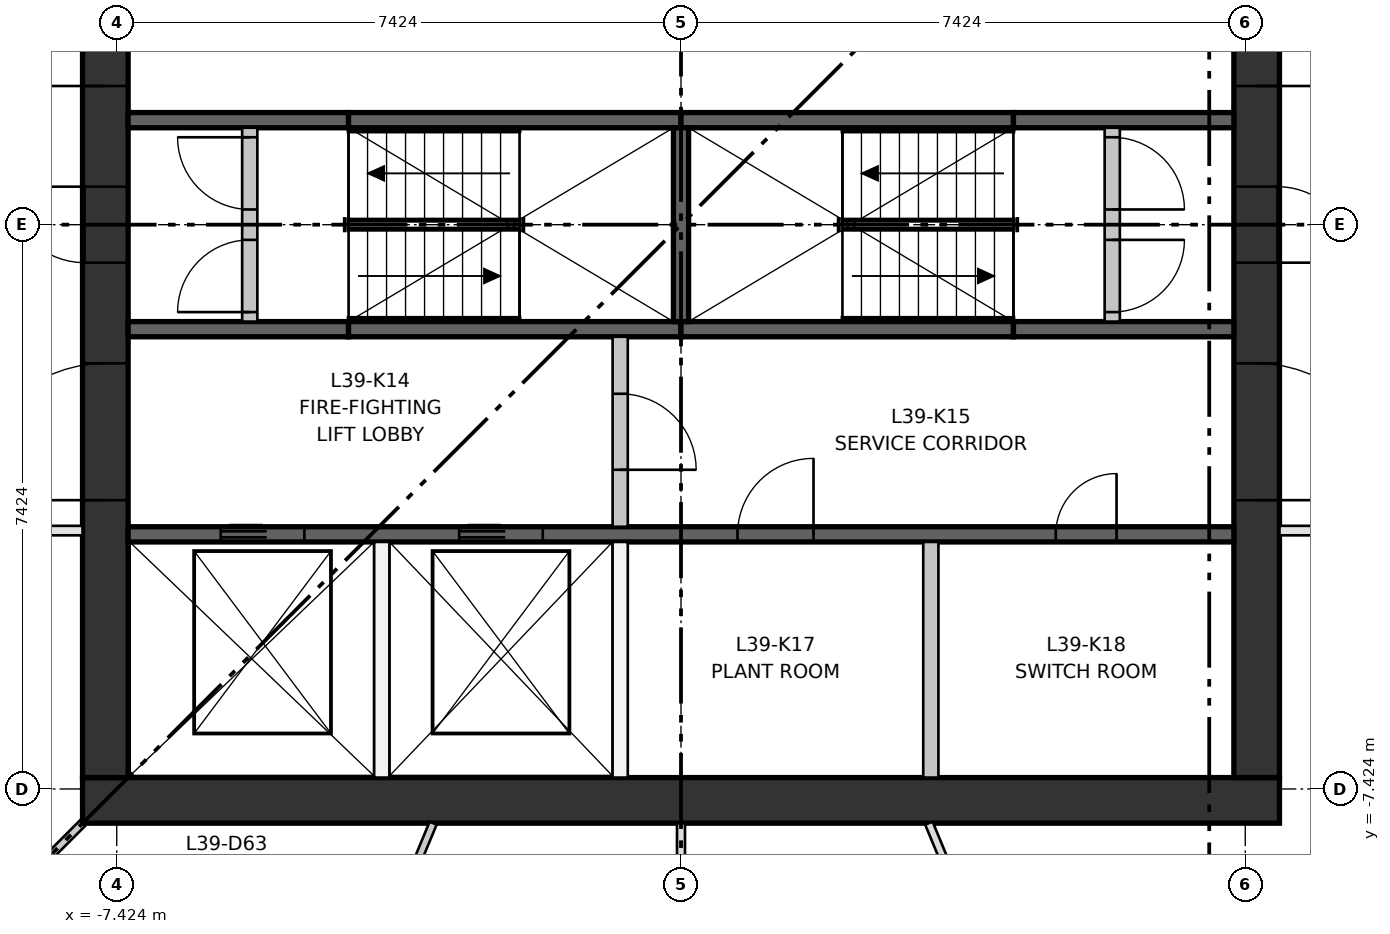
"""IFC4 building model, lengths in metres.
Left out: names, types, materials, properties, quantities, classifications, styles, units other than length and angle.
Written with IfcOpenShell. Run it as: python <this file> out.ifc"""

import sys

from ifc_helpers import new_model, si_unit, direction, frame, frame_2d, origin, place, context, subcontext, project, spatial, rectangle, extrude, element, fill, save


model = new_model("IFC4")
c1 = context("Model", 3, precision=1e-05, world=origin(), true_north=direction((0.0, 1.0)))
c2 = subcontext(c1, "Body", "Model", "MODEL_VIEW")
j1 = project(units=[si_unit("LENGTHUNIT", "METRE"), si_unit("PLANEANGLEUNIT", "RADIAN")], contexts=[c1])
p1 = place(None, origin())
s1 = spatial("IfcSite", under=j1, at=p1, CompositionType="ELEMENT")
p2 = place(p1, origin())
s2 = spatial("IfcBuilding", under=s1, at=p2, CompositionType="ELEMENT")
p3 = place(p2, frame((0.0, 0.0, 147.75)))
s3 = spatial("IfcBuildingStorey", under=s2, at=p3, CompositionType="ELEMENT", Elevation=147.75)
p4 = place(p3, frame((-7.874, -7.574, 0.0), z_axis=(0.0, 0.0, 1.0), x_axis=(1.0, 0.0, 0.0)))
e1 = element("IfcWall", 1, at=p4, inside=s3, PredefinedType="SHEAR", context=c2, shape_type="SweptSolid", body=[
    extrude(rectangle(XDim=15.748, YDim=0.6, at=frame_2d((7.874, 0.0))), origin(), (0.0, 0.0, 1.0), 3.35),
])
p5 = place(p3, frame((-7.574, -7.274, 0.0), z_axis=(0.0, 0.0, 1.0), x_axis=(0.0, 1.0, 0.0)))
e2 = element("IfcWall", 2, at=p5, inside=s3, PredefinedType="SHEAR", context=c2, shape_type="SweptSolid", body=[
    extrude(rectangle(XDim=14.548, YDim=0.6, at=frame_2d((7.274, 0.0))), origin(), (0.0, 0.0, 1.0), 3.35),
])
p6 = place(p5, frame((6.774, 0.0, 0.0)))
e3 = element("IfcOpeningElement", 3, at=p6, cuts=e2, PredefinedType="OPENING", context=c2, shape_type="SweptSolid", body=[
    extrude(rectangle(XDim=1.0, YDim=2.1, at=frame_2d((0.5, 1.05))), frame((0.0, 0.31, 0.0), z_axis=(0.0, -1.0, 0.0), x_axis=(1.0, 0.0, 0.0)), (0.0, 0.0, 1.0), 0.62),
])
p7 = place(p5, frame((3.649, 0.0, 0.0)))
e4 = element("IfcOpeningElement", 4, at=p7, cuts=e2, PredefinedType="OPENING", context=c2, shape_type="SweptSolid", body=[
    extrude(rectangle(XDim=1.8, YDim=2.1, at=frame_2d((0.9, 1.05))), frame((0.0, 0.31, 0.0), z_axis=(0.0, -1.0, 0.0), x_axis=(1.0, 0.0, 0.0)), (0.0, 0.0, 1.0), 0.62),
])
p8 = place(p5, frame((9.098, 0.0, 0.0)))
e5 = element("IfcOpeningElement", 5, at=p8, cuts=e2, PredefinedType="OPENING", context=c2, shape_type="SweptSolid", body=[
    extrude(rectangle(XDim=1.8, YDim=2.1, at=frame_2d((0.9, 1.05))), frame((0.0, 0.31, 0.0), z_axis=(0.0, -1.0, 0.0), x_axis=(1.0, 0.0, 0.0)), (0.0, 0.0, 1.0), 0.62),
])
p9 = place(p3, frame((7.574, -7.274, 0.0), z_axis=(0.0, 0.0, 1.0), x_axis=(0.0, 1.0, 0.0)))
e6 = element("IfcWall", 6, at=p9, inside=s3, PredefinedType="SHEAR", context=c2, shape_type="SweptSolid", body=[
    extrude(rectangle(XDim=14.548, YDim=0.6, at=frame_2d((7.274, 0.0))), origin(), (0.0, 0.0, 1.0), 3.35),
])
p10 = place(p9, frame((6.774, 0.0, 0.0)))
e7 = element("IfcOpeningElement", 7, at=p10, cuts=e6, PredefinedType="OPENING", context=c2, shape_type="SweptSolid", body=[
    extrude(rectangle(XDim=1.0, YDim=2.1, at=frame_2d((0.5, 1.05))), frame((0.0, 0.31, 0.0), z_axis=(0.0, -1.0, 0.0), x_axis=(1.0, 0.0, 0.0)), (0.0, 0.0, 1.0), 0.62),
])
p11 = place(p9, frame((3.649, 0.0, 0.0)))
e8 = element("IfcOpeningElement", 8, at=p11, cuts=e6, PredefinedType="OPENING", context=c2, shape_type="SweptSolid", body=[
    extrude(rectangle(XDim=1.8, YDim=2.1, at=frame_2d((0.9, 1.05))), frame((0.0, 0.31, 0.0), z_axis=(0.0, -1.0, 0.0), x_axis=(1.0, 0.0, 0.0)), (0.0, 0.0, 1.0), 0.62),
])
p12 = place(p9, frame((9.098, 0.0, 0.0)))
e9 = element("IfcOpeningElement", 9, at=p12, cuts=e6, PredefinedType="OPENING", context=c2, shape_type="SweptSolid", body=[
    extrude(rectangle(XDim=1.8, YDim=2.1, at=frame_2d((0.9, 1.05))), frame((0.0, 0.31, 0.0), z_axis=(0.0, -1.0, 0.0), x_axis=(1.0, 0.0, 0.0)), (0.0, 0.0, 1.0), 0.62),
])
p13 = place(p3, frame((-7.274, -4.074, 0.0), z_axis=(0.0, 0.0, 1.0), x_axis=(1.0, 0.0, 0.0)))
e10 = element("IfcWall", 10, at=p13, inside=s3, PredefinedType="SHEAR", context=c2, shape_type="SweptSolid", body=[
    extrude(rectangle(XDim=14.548, YDim=0.2, at=frame_2d((7.274, 0.0))), origin(), (0.0, 0.0, 1.0), 3.0),
])
p14 = place(p13, frame((1.219, 0.0, 0.0)))
e11 = element("IfcOpeningElement", 11, at=p14, cuts=e10, PredefinedType="OPENING", context=c2, shape_type="SweptSolid", body=[
    extrude(rectangle(XDim=1.1, YDim=2.1, at=frame_2d((0.55, 1.05))), frame((0.0, 0.11, 0.0), z_axis=(0.0, -1.0, 0.0), x_axis=(1.0, 0.0, 0.0)), (0.0, 0.0, 1.0), 0.22),
])
p15 = place(p13, frame((4.355, 0.0, 0.0)))
e12 = element("IfcOpeningElement", 12, at=p15, cuts=e10, PredefinedType="OPENING", context=c2, shape_type="SweptSolid", body=[
    extrude(rectangle(XDim=1.1, YDim=2.1, at=frame_2d((0.55, 1.05))), frame((0.0, 0.11, 0.0), z_axis=(0.0, -1.0, 0.0), x_axis=(1.0, 0.0, 0.0)), (0.0, 0.0, 1.0), 0.22),
])
p16 = place(p13, frame((8.018, 0.0, 0.0)))
e13 = element("IfcOpeningElement", 13, at=p16, cuts=e10, PredefinedType="OPENING", context=c2, shape_type="SweptSolid", body=[
    extrude(rectangle(XDim=1.0, YDim=2.1, at=frame_2d((0.5, 1.05))), frame((0.0, 0.11, 0.0), z_axis=(0.0, -1.0, 0.0), x_axis=(1.0, 0.0, 0.0)), (0.0, 0.0, 1.0), 0.22),
])
p17 = place(p13, frame((12.205, 0.0, 0.0)))
e14 = element("IfcOpeningElement", 14, at=p17, cuts=e10, PredefinedType="OPENING", context=c2, shape_type="SweptSolid", body=[
    extrude(rectangle(XDim=0.8, YDim=2.1, at=frame_2d((0.4, 1.05))), frame((0.0, 0.11, 0.0), z_axis=(0.0, -1.0, 0.0), x_axis=(1.0, 0.0, 0.0)), (0.0, 0.0, 1.0), 0.22),
])
p18 = place(p3, frame((-7.274, -1.375, 0.0), z_axis=(0.0, 0.0, 1.0), x_axis=(1.0, 0.0, 0.0)))
e15 = element("IfcWall", 15, at=p18, inside=s3, PredefinedType="SHEAR", context=c2, shape_type="SweptSolid", body=[
    extrude(rectangle(XDim=2.9, YDim=0.2, at=frame_2d((1.45, 0.0))), origin(), (0.0, 0.0, 1.0), 3.0),
])
for number, where, z_axis, x_axis in (
    (16, (-4.374, -1.375, 0.0), (0.0, 0.0, 1.0), (1.0, 0.0, 0.0)),
    (17, (0.0, -1.375, 0.0), (0.0, 0.0, 1.0), (1.0, 0.0, 0.0)),
):
    element("IfcWall", number, at=place(p3, frame(where, z_axis=z_axis, x_axis=x_axis)), inside=s3, PredefinedType="SHEAR", context=c2, shape_type="SweptSolid", body=[
        extrude(rectangle(XDim=4.374, YDim=0.2, at=frame_2d((2.187, 0.0))), origin(), (0.0, 0.0, 1.0), 3.0),
    ])
for number, where, z_axis, x_axis in (
    (18, (4.374, -1.375, 0.0), (0.0, 0.0, 1.0), (1.0, 0.0, 0.0)),
    (19, (-7.274, 1.375, 0.0), (0.0, 0.0, 1.0), (1.0, 0.0, 0.0)),
):
    element("IfcWall", number, at=place(p3, frame(where, z_axis=z_axis, x_axis=x_axis)), inside=s3, PredefinedType="SHEAR", context=c2, shape_type="SweptSolid", body=[
        extrude(rectangle(XDim=2.9, YDim=0.2, at=frame_2d((1.45, 0.0))), origin(), (0.0, 0.0, 1.0), 3.0),
    ])
for number, where, z_axis, x_axis in (
    (20, (-4.374, 1.375, 0.0), (0.0, 0.0, 1.0), (1.0, 0.0, 0.0)),
    (21, (0.0, 1.375, 0.0), (0.0, 0.0, 1.0), (1.0, 0.0, 0.0)),
):
    element("IfcWall", number, at=place(p3, frame(where, z_axis=z_axis, x_axis=x_axis)), inside=s3, PredefinedType="SHEAR", context=c2, shape_type="SweptSolid", body=[
        extrude(rectangle(XDim=4.374, YDim=0.2, at=frame_2d((2.187, 0.0))), origin(), (0.0, 0.0, 1.0), 3.0),
    ])
p19 = place(p3, frame((4.374, 1.375, 0.0), z_axis=(0.0, 0.0, 1.0), x_axis=(1.0, 0.0, 0.0)))
e22 = element("IfcWall", 22, at=p19, inside=s3, PredefinedType="SHEAR", context=c2, shape_type="SweptSolid", body=[
    extrude(rectangle(XDim=2.9, YDim=0.2, at=frame_2d((1.45, 0.0))), origin(), (0.0, 0.0, 1.0), 3.0),
])
p20 = place(p3, frame((0.0, -1.275, 0.0), z_axis=(0.0, 0.0, 1.0), x_axis=(0.0, 1.0, 0.0)))
e23 = element("IfcWall", 23, at=p20, inside=s3, PredefinedType="SHEAR", context=c2, shape_type="SweptSolid", body=[
    extrude(rectangle(XDim=2.55, YDim=0.2, at=frame_2d((1.275, 0.0))), origin(), (0.0, 0.0, 1.0), 3.0),
])
for number, where, z_axis, x_axis in (
    (24, (-3.937, -7.274, 0.0), (0.0, 0.0, 1.0), (0.0, 1.0, 0.0)),
    (25, (-0.8, -7.274, 0.0), (0.0, 0.0, 1.0), (0.0, 1.0, 0.0)),
):
    element("IfcWall", number, at=place(p3, frame(where, z_axis=z_axis, x_axis=x_axis)), inside=s3, PredefinedType="PARTITIONING", context=c2, shape_type="SweptSolid", body=[
        extrude(rectangle(XDim=3.1, YDim=0.2, at=frame_2d((1.55, 0.0))), origin(), (0.0, 0.0, 1.0), 3.0),
    ])
p21 = place(p3, frame((-0.8, -3.974, 0.0), z_axis=(0.0, 0.0, 1.0), x_axis=(0.0, 1.0, 0.0)))
e26 = element("IfcWall", 26, at=p21, inside=s3, PredefinedType="PARTITIONING", context=c2, shape_type="SweptSolid", body=[
    extrude(rectangle(XDim=2.499, YDim=0.2, at=frame_2d((1.25, 0.0))), origin(), (0.0, 0.0, 1.0), 3.0),
])
p22 = place(p21, frame((0.75, 0.0, 0.0)))
e27 = element("IfcOpeningElement", 27, at=p22, cuts=e26, PredefinedType="OPENING", context=c2, shape_type="SweptSolid", body=[
    extrude(rectangle(XDim=1.0, YDim=2.1, at=frame_2d((0.5, 1.05))), frame((0.0, 0.11, 0.0), z_axis=(0.0, -1.0, 0.0), x_axis=(1.0, 0.0, 0.0)), (0.0, 0.0, 1.0), 0.22),
])
p23 = place(p3, frame((3.287, -7.274, 0.0), z_axis=(0.0, 0.0, 1.0), x_axis=(0.0, 1.0, 0.0)))
e28 = element("IfcWall", 28, at=p23, inside=s3, PredefinedType="PARTITIONING", context=c2, shape_type="SweptSolid", body=[
    extrude(rectangle(XDim=3.1, YDim=0.2, at=frame_2d((1.55, 0.0))), origin(), (0.0, 0.0, 1.0), 3.0),
])
p24 = place(p3, frame((-5.674, -1.275, 0.0), z_axis=(0.0, 0.0, 1.0), x_axis=(0.0, 1.0, 0.0)))
e29 = element("IfcWall", 29, at=p24, inside=s3, PredefinedType="PARTITIONING", context=c2, shape_type="SweptSolid", body=[
    extrude(rectangle(XDim=2.55, YDim=0.2, at=frame_2d((1.275, 0.0))), origin(), (0.0, 0.0, 1.0), 3.0),
])
p25 = place(p24, frame((0.125, 0.0, 0.0)))
e30 = element("IfcOpeningElement", 30, at=p25, cuts=e29, PredefinedType="OPENING", context=c2, shape_type="SweptSolid", body=[
    extrude(rectangle(XDim=0.95, YDim=2.1, at=frame_2d((0.475, 1.05))), frame((0.0, 0.11, 0.0), z_axis=(0.0, -1.0, 0.0), x_axis=(1.0, 0.0, 0.0)), (0.0, 0.0, 1.0), 0.22),
])
p26 = place(p24, frame((1.475, 0.0, 0.0)))
e31 = element("IfcOpeningElement", 31, at=p26, cuts=e29, PredefinedType="OPENING", context=c2, shape_type="SweptSolid", body=[
    extrude(rectangle(XDim=0.95, YDim=2.1, at=frame_2d((0.475, 1.05))), frame((0.0, 0.11, 0.0), z_axis=(0.0, -1.0, 0.0), x_axis=(1.0, 0.0, 0.0)), (0.0, 0.0, 1.0), 0.22),
])
p27 = place(p3, frame((5.674, -1.275, 0.0), z_axis=(0.0, 0.0, 1.0), x_axis=(0.0, 1.0, 0.0)))
e32 = element("IfcWall", 32, at=p27, inside=s3, PredefinedType="PARTITIONING", context=c2, shape_type="SweptSolid", body=[
    extrude(rectangle(XDim=2.55, YDim=0.2, at=frame_2d((1.275, 0.0))), origin(), (0.0, 0.0, 1.0), 3.0),
])
p28 = place(p27, frame((0.125, 0.0, 0.0)))
e33 = element("IfcOpeningElement", 33, at=p28, cuts=e32, PredefinedType="OPENING", context=c2, shape_type="SweptSolid", body=[
    extrude(rectangle(XDim=0.95, YDim=2.1, at=frame_2d((0.475, 1.05))), frame((0.0, 0.11, 0.0), z_axis=(0.0, -1.0, 0.0), x_axis=(1.0, 0.0, 0.0)), (0.0, 0.0, 1.0), 0.22),
])
p29 = place(p27, frame((1.475, 0.0, 0.0)))
e34 = element("IfcOpeningElement", 34, at=p29, cuts=e32, PredefinedType="OPENING", context=c2, shape_type="SweptSolid", body=[
    extrude(rectangle(XDim=0.95, YDim=2.1, at=frame_2d((0.475, 1.05))), frame((0.0, 0.11, 0.0), z_axis=(0.0, -1.0, 0.0), x_axis=(1.0, 0.0, 0.0)), (0.0, 0.0, 1.0), 0.22),
])
p30 = place(p3, frame((11.403, -4.024, 0.0), z_axis=(0.0, 0.0, 1.0), x_axis=(-1.0, 0.0, 0.0)))
e35 = element("IfcWall", 35, at=p30, inside=s3, PredefinedType="PARTITIONING", context=c2, shape_type="SweptSolid", body=[
    extrude(rectangle(XDim=3.529, YDim=0.125, at=frame_2d((1.764, 0.0))), origin(), (0.0, 0.0, 1.0), 3.0),
])
p31 = place(p30, frame((0.9, 0.0, 0.0)))
e36 = element("IfcOpeningElement", 36, at=p31, cuts=e35, PredefinedType="OPENING", context=c2, shape_type="SweptSolid", body=[
    extrude(rectangle(XDim=1.8, YDim=2.1, at=frame_2d((0.9, 1.05))), frame((0.0, 0.073, 0.0), z_axis=(0.0, -1.0, 0.0), x_axis=(1.0, 0.0, 0.0)), (0.0, 0.0, 1.0), 0.145),
])
p32 = place(p3, frame((-7.874, -4.024, 0.0), z_axis=(0.0, 0.0, 1.0), x_axis=(-1.0, 0.0, 0.0)))
e37 = element("IfcWall", 37, at=p32, inside=s3, PredefinedType="PARTITIONING", context=c2, shape_type="SweptSolid", body=[
    extrude(rectangle(XDim=3.634, YDim=0.125, at=frame_2d((1.817, 0.0))), origin(), (0.0, 0.0, 1.0), 3.0),
])
p33 = place(p32, frame((1.3, 0.0, 0.0)))
e38 = element("IfcOpeningElement", 38, at=p33, cuts=e37, PredefinedType="OPENING", context=c2, shape_type="SweptSolid", body=[
    extrude(rectangle(XDim=1.0, YDim=2.1, at=frame_2d((0.5, 1.05))), frame((0.0, 0.073, 0.0), z_axis=(0.0, -1.0, 0.0), x_axis=(1.0, 0.0, 0.0)), (0.0, 0.0, 1.0), 0.145),
])
p34 = place(p3, frame((-7.874, -7.874, 0.0), z_axis=(0.0, 0.0, 1.0), x_axis=(-0.707106781187, -0.707106781187, 0.0)))
e39 = element("IfcWall", 39, at=p34, inside=s3, PredefinedType="PARTITIONING", context=c2, shape_type="SweptSolid", body=[
    extrude(rectangle(XDim=6.634, YDim=0.1, at=frame_2d((3.317, 0.0))), origin(), (0.0, 0.0, 1.0), 3.0),
])
p35 = place(p34, frame((2.6, 0.0, 0.0)))
e40 = element("IfcOpeningElement", 40, at=p35, cuts=e39, PredefinedType="OPENING", context=c2, shape_type="SweptSolid", body=[
    extrude(rectangle(XDim=1.0, YDim=2.1, at=frame_2d((0.5, 1.05))), frame((0.0, 0.06, 0.0), z_axis=(0.0, -1.0, 0.0), x_axis=(1.0, 0.0, 0.0)), (0.0, 0.0, 1.0), 0.12),
])
p36 = place(p3, frame((-3.261, -7.874, 0.0), z_axis=(0.0, 0.0, 1.0), x_axis=(-0.382701956612, -0.923871859299, 0.0)))
e41 = element("IfcWall", 41, at=p36, inside=s3, PredefinedType="PARTITIONING", context=c2, shape_type="SweptSolid", body=[
    extrude(rectangle(XDim=4.577, YDim=0.1, at=frame_2d((2.289, 0.0))), origin(), (0.0, 0.0, 1.0), 3.0),
])
p37 = place(p36, frame((1.8, 0.0, 0.0)))
e42 = element("IfcOpeningElement", 42, at=p37, cuts=e41, PredefinedType="OPENING", context=c2, shape_type="SweptSolid", body=[
    extrude(rectangle(XDim=1.0, YDim=2.1, at=frame_2d((0.5, 1.05))), frame((0.0, 0.06, 0.0), z_axis=(0.0, -1.0, 0.0), x_axis=(1.0, 0.0, 0.0)), (0.0, 0.0, 1.0), 0.12),
])
p38 = place(p3, frame((0.0, -7.874, 0.0), z_axis=(0.0, 0.0, 1.0), x_axis=(0.0, -1.0, 0.0)))
e43 = element("IfcWall", 43, at=p38, inside=s3, PredefinedType="PARTITIONING", context=c2, shape_type="SweptSolid", body=[
    extrude(rectangle(XDim=5.226, YDim=0.105, at=frame_2d((2.613, 0.0))), origin(), (0.0, 0.0, 1.0), 3.0),
])
p39 = place(p38, frame((2.1, 0.0, 0.0)))
e44 = element("IfcOpeningElement", 44, at=p39, cuts=e43, PredefinedType="OPENING", context=c2, shape_type="SweptSolid", body=[
    extrude(rectangle(XDim=1.0, YDim=2.1, at=frame_2d((0.5, 1.05))), frame((0.0, 0.062, 0.0), z_axis=(0.0, -1.0, 0.0), x_axis=(1.0, 0.0, 0.0)), (0.0, 0.0, 1.0), 0.125),
])
p40 = place(p3, frame((3.261, -7.874, 0.0), z_axis=(0.0, 0.0, 1.0), x_axis=(0.382701956612, -0.923871859299, 0.0)))
e45 = element("IfcWall", 45, at=p40, inside=s3, PredefinedType="PARTITIONING", context=c2, shape_type="SweptSolid", body=[
    extrude(rectangle(XDim=4.577, YDim=0.105, at=frame_2d((2.289, 0.0))), origin(), (0.0, 0.0, 1.0), 3.0),
])
p41 = place(p14, origin())
e46 = element("IfcDoor", 46, at=p41, inside=s3, OperationType="DOUBLE_DOOR_SLIDING", PredefinedType="DOOR", context=c2, shape_type="SweptSolid", body=[
    extrude(rectangle(XDim=1.1, YDim=2.1, at=frame_2d((0.55, 1.05))), frame((0.0, 0.025, 0.0), z_axis=(0.0, -1.0, 0.0), x_axis=(1.0, 0.0, 0.0)), (0.0, 0.0, 1.0), 0.05),
])
fill(e11, e46)
p42 = place(p15, origin())
e47 = element("IfcDoor", 47, at=p42, inside=s3, OperationType="DOUBLE_DOOR_SLIDING", PredefinedType="DOOR", context=c2, shape_type="SweptSolid", body=[
    extrude(rectangle(XDim=1.1, YDim=2.1, at=frame_2d((0.55, 1.05))), frame((0.0, 0.025, 0.0), z_axis=(0.0, -1.0, 0.0), x_axis=(1.0, 0.0, 0.0)), (0.0, 0.0, 1.0), 0.05),
])
fill(e12, e47)
p43 = place(p25, origin())
e48 = element("IfcDoor", 48, at=p43, inside=s3, OperationType="SINGLE_SWING_LEFT", PredefinedType="DOOR", context=c2, shape_type="SweptSolid", body=[
    extrude(rectangle(XDim=0.95, YDim=2.1, at=frame_2d((0.475, 1.05))), frame((0.0, 0.025, 0.0), z_axis=(0.0, -1.0, 0.0), x_axis=(1.0, 0.0, 0.0)), (0.0, 0.0, 1.0), 0.05),
])
fill(e30, e48)
p44 = place(p26, origin())
e49 = element("IfcDoor", 49, at=p44, inside=s3, OperationType="SINGLE_SWING_RIGHT", PredefinedType="DOOR", context=c2, shape_type="SweptSolid", body=[
    extrude(rectangle(XDim=0.95, YDim=2.1, at=frame_2d((0.475, 1.05))), frame((0.0, 0.025, 0.0), z_axis=(0.0, -1.0, 0.0), x_axis=(1.0, 0.0, 0.0)), (0.0, 0.0, 1.0), 0.05),
])
fill(e31, e49)
p45 = place(p28, frame((0.95, 0.0, 0.0), z_axis=(0.0, 0.0, 1.0), x_axis=(-1.0, 0.0, 0.0)))
e50 = element("IfcDoor", 50, at=p45, inside=s3, OperationType="SINGLE_SWING_RIGHT", PredefinedType="DOOR", context=c2, shape_type="SweptSolid", body=[
    extrude(rectangle(XDim=0.95, YDim=2.1, at=frame_2d((0.475, 1.05))), frame((0.0, 0.025, 0.0), z_axis=(0.0, -1.0, 0.0), x_axis=(1.0, 0.0, 0.0)), (0.0, 0.0, 1.0), 0.05),
])
fill(e33, e50)
p46 = place(p29, frame((0.95, 0.0, 0.0), z_axis=(0.0, 0.0, 1.0), x_axis=(-1.0, 0.0, 0.0)))
e51 = element("IfcDoor", 51, at=p46, inside=s3, OperationType="SINGLE_SWING_LEFT", PredefinedType="DOOR", context=c2, shape_type="SweptSolid", body=[
    extrude(rectangle(XDim=0.95, YDim=2.1, at=frame_2d((0.475, 1.05))), frame((0.0, 0.025, 0.0), z_axis=(0.0, -1.0, 0.0), x_axis=(1.0, 0.0, 0.0)), (0.0, 0.0, 1.0), 0.05),
])
fill(e34, e51)
p47 = place(p22, frame((1.0, 0.0, 0.0), z_axis=(0.0, 0.0, 1.0), x_axis=(-1.0, 0.0, 0.0)))
e52 = element("IfcDoor", 52, at=p47, inside=s3, OperationType="SINGLE_SWING_LEFT", PredefinedType="DOOR", context=c2, shape_type="SweptSolid", body=[
    extrude(rectangle(XDim=1.0, YDim=2.1, at=frame_2d((0.5, 1.05))), frame((0.0, 0.025, 0.0), z_axis=(0.0, -1.0, 0.0), x_axis=(1.0, 0.0, 0.0)), (0.0, 0.0, 1.0), 0.05),
])
fill(e27, e52)
p48 = place(p16, origin())
e53 = element("IfcDoor", 53, at=p48, inside=s3, OperationType="SINGLE_SWING_RIGHT", PredefinedType="DOOR", context=c2, shape_type="SweptSolid", body=[
    extrude(rectangle(XDim=1.0, YDim=2.1, at=frame_2d((0.5, 1.05))), frame((0.0, 0.025, 0.0), z_axis=(0.0, -1.0, 0.0), x_axis=(1.0, 0.0, 0.0)), (0.0, 0.0, 1.0), 0.05),
])
fill(e13, e53)
p49 = place(p17, origin())
e54 = element("IfcDoor", 54, at=p49, inside=s3, OperationType="SINGLE_SWING_RIGHT", PredefinedType="DOOR", context=c2, shape_type="SweptSolid", body=[
    extrude(rectangle(XDim=0.8, YDim=2.1, at=frame_2d((0.4, 1.05))), frame((0.0, 0.025, 0.0), z_axis=(0.0, -1.0, 0.0), x_axis=(1.0, 0.0, 0.0)), (0.0, 0.0, 1.0), 0.05),
])
fill(e14, e54)
p50 = place(p6, origin())
e55 = element("IfcDoor", 55, at=p50, inside=s3, OperationType="SINGLE_SWING_RIGHT", PredefinedType="DOOR", context=c2, shape_type="SweptSolid", body=[
    extrude(rectangle(XDim=1.0, YDim=2.1, at=frame_2d((0.5, 1.05))), frame((0.0, 0.3, 0.0), z_axis=(0.0, -1.0, 0.0), x_axis=(1.0, 0.0, 0.0)), (0.0, 0.0, 1.0), 0.05),
])
fill(e3, e55)
p51 = place(p7, origin())
e56 = element("IfcDoor", 56, at=p51, inside=s3, OperationType="DOUBLE_DOOR_SINGLE_SWING", PredefinedType="DOOR", context=c2, shape_type="SweptSolid", body=[
    extrude(rectangle(XDim=1.8, YDim=2.1, at=frame_2d((0.9, 1.05))), frame((0.0, 0.025, 0.0), z_axis=(0.0, -1.0, 0.0), x_axis=(1.0, 0.0, 0.0)), (0.0, 0.0, 1.0), 0.05),
])
fill(e4, e56)
p52 = place(p8, origin())
e57 = element("IfcDoor", 57, at=p52, inside=s3, OperationType="DOUBLE_DOOR_SINGLE_SWING", PredefinedType="DOOR", context=c2, shape_type="SweptSolid", body=[
    extrude(rectangle(XDim=1.8, YDim=2.1, at=frame_2d((0.9, 1.05))), frame((0.0, 0.025, 0.0), z_axis=(0.0, -1.0, 0.0), x_axis=(1.0, 0.0, 0.0)), (0.0, 0.0, 1.0), 0.05),
])
fill(e5, e57)
p53 = place(p10, frame((1.0, 0.0, 0.0), z_axis=(0.0, 0.0, 1.0), x_axis=(-1.0, 0.0, 0.0)))
e58 = element("IfcDoor", 58, at=p53, inside=s3, OperationType="SINGLE_SWING_LEFT", PredefinedType="DOOR", context=c2, shape_type="SweptSolid", body=[
    extrude(rectangle(XDim=1.0, YDim=2.1, at=frame_2d((0.5, 1.05))), frame((0.0, 0.3, 0.0), z_axis=(0.0, -1.0, 0.0), x_axis=(1.0, 0.0, 0.0)), (0.0, 0.0, 1.0), 0.05),
])
fill(e7, e58)
p54 = place(p11, frame((1.8, 0.0, 0.0), z_axis=(0.0, 0.0, 1.0), x_axis=(-1.0, 0.0, 0.0)))
e59 = element("IfcDoor", 59, at=p54, inside=s3, OperationType="DOUBLE_DOOR_SINGLE_SWING", PredefinedType="DOOR", context=c2, shape_type="SweptSolid", body=[
    extrude(rectangle(XDim=1.8, YDim=2.1, at=frame_2d((0.9, 1.05))), frame((0.0, 0.025, 0.0), z_axis=(0.0, -1.0, 0.0), x_axis=(1.0, 0.0, 0.0)), (0.0, 0.0, 1.0), 0.05),
])
fill(e8, e59)
p55 = place(p12, frame((1.8, 0.0, 0.0), z_axis=(0.0, 0.0, 1.0), x_axis=(-1.0, 0.0, 0.0)))
e60 = element("IfcDoor", 60, at=p55, inside=s3, OperationType="DOUBLE_DOOR_SINGLE_SWING", PredefinedType="DOOR", context=c2, shape_type="SweptSolid", body=[
    extrude(rectangle(XDim=1.8, YDim=2.1, at=frame_2d((0.9, 1.05))), frame((0.0, 0.025, 0.0), z_axis=(0.0, -1.0, 0.0), x_axis=(1.0, 0.0, 0.0)), (0.0, 0.0, 1.0), 0.05),
])
fill(e9, e60)
save(model, sys.argv[1])
